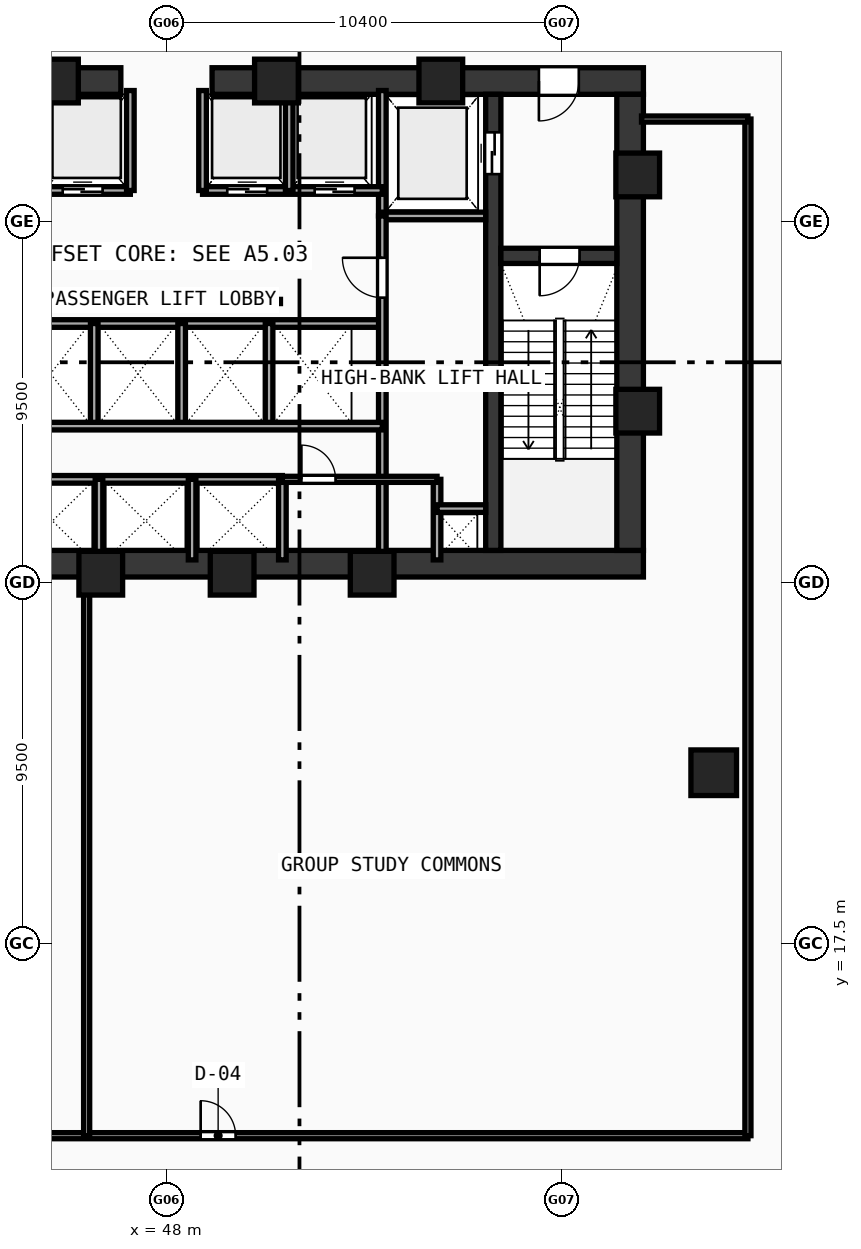
"""IFC4 building model, lengths in metres.
Left out: names, types, materials, properties, quantities, classifications, styles, units other than length and angle.
Written with IfcOpenShell. Run it as: python <this file> out.ifc"""

import sys

from ifc_helpers import new_model, si_unit, direction, frame, frame_2d, origin, origin_with_axes, origin_2d, place, context, subcontext, project, spatial, rectangle, hollow_rectangle, extrude, source, transform, mapped, element, fill, save


model = new_model("IFC4")
c1 = context("Model", 3, precision=1e-05, world=origin(), true_north=direction((0.0, 1.0)))
c2 = subcontext(c1, "Body", "Model", "MODEL_VIEW")
j1 = project(units=[si_unit("LENGTHUNIT", "METRE"), si_unit("PLANEANGLEUNIT", "RADIAN")], contexts=[c1])
p1 = place(None, origin())
s1 = spatial("IfcSite", under=j1, at=p1, CompositionType="ELEMENT")
p2 = place(p1, origin())
s2 = spatial("IfcBuilding", under=s1, at=p2, CompositionType="ELEMENT")
p3 = place(p2, frame((0.0, 0.0, 9.6)))
s3 = spatial("IfcBuildingStorey", under=s2, at=p3, CompositionType="ELEMENT", Elevation=9.6)
p4 = place(p3, frame((35.45, 27.5, 0.0), z_axis=(0.0, 0.0, 1.0), x_axis=(1.0, 0.0, 0.0)))
e1 = element("IfcWall", 1, at=p4, inside=s3, PredefinedType="SHEAR", context=c2, shape_type="SweptSolid", body=[
    extrude(rectangle(XDim=25.1, YDim=0.7, at=frame_2d((12.55, 0.0))), origin(), (0.0, 0.0, 1.0), 4.52),
])
p5 = place(p3, frame((35.45, 40.2, 0.0), z_axis=(0.0, 0.0, 1.0), x_axis=(1.0, 0.0, 0.0)))
e2 = element("IfcWall", 2, at=p5, inside=s3, PredefinedType="SHEAR", context=c2, shape_type="SweptSolid", body=[
    extrude(rectangle(XDim=11.35, YDim=0.7, at=frame_2d((5.675, 0.0))), origin(), (0.0, 0.0, 1.0), 4.52),
])
p6 = place(p5, frame((1.7, 0.0, 0.0)))
e3 = element("IfcOpeningElement", 3, at=p6, cuts=e2, PredefinedType="OPENING", context=c2, shape_type="SweptSolid", body=[
    extrude(rectangle(XDim=1.05, YDim=2.1, at=frame_2d((0.525, 1.05))), frame((0.0, 0.36, 0.0), z_axis=(0.0, -1.0, 0.0), x_axis=(1.0, 0.0, 0.0)), (0.0, 0.0, 1.0), 0.72),
])
p7 = place(p3, frame((49.2, 40.2, 0.0), z_axis=(0.0, 0.0, 1.0), x_axis=(1.0, 0.0, 0.0)))
e4 = element("IfcWall", 4, at=p7, inside=s3, PredefinedType="SHEAR", context=c2, shape_type="SweptSolid", body=[
    extrude(rectangle(XDim=11.35, YDim=0.7, at=frame_2d((5.675, 0.0))), origin(), (0.0, 0.0, 1.0), 4.52),
])
p8 = place(p7, frame((8.6, 0.0, 0.0)))
e5 = element("IfcOpeningElement", 5, at=p8, cuts=e4, PredefinedType="OPENING", context=c2, shape_type="SweptSolid", body=[
    extrude(rectangle(XDim=1.05, YDim=2.1, at=frame_2d((0.525, 1.05))), frame((0.0, 0.36, 0.0), z_axis=(0.0, -1.0, 0.0), x_axis=(1.0, 0.0, 0.0)), (0.0, 0.0, 1.0), 0.72),
])
p9 = place(p3, frame((60.2, 27.85, 0.0), z_axis=(0.0, 0.0, 1.0), x_axis=(0.0, 1.0, 0.0)))
e6 = element("IfcWall", 6, at=p9, inside=s3, PredefinedType="SHEAR", context=c2, shape_type="SweptSolid", body=[
    extrude(rectangle(XDim=12.0, YDim=0.7, at=frame_2d((6.0, 0.0))), origin(), (0.0, 0.0, 1.0), 4.52),
])
p10 = place(p3, frame((56.6, 27.85, 0.0), z_axis=(0.0, 0.0, 1.0), x_axis=(0.0, 1.0, 0.0)))
e7 = element("IfcWall", 7, at=p10, inside=s3, PredefinedType="SHEAR", context=c2, shape_type="SweptSolid", body=[
    extrude(rectangle(XDim=12.0, YDim=0.4, at=frame_2d((6.0, 0.0))), origin(), (0.0, 0.0, 1.0), 4.52),
])
p11 = place(p10, frame((9.9, 0.0, 0.0)))
e8 = element("IfcOpeningElement", 8, at=p11, cuts=e7, PredefinedType="OPENING", context=c2, shape_type="SweptSolid", body=[
    extrude(rectangle(XDim=1.1, YDim=2.1, at=frame_2d((0.55, 1.05))), frame((0.0, 0.21, 0.0), z_axis=(0.0, -1.0, 0.0), x_axis=(1.0, 0.0, 0.0)), (0.0, 0.0, 1.0), 0.42),
])
p12 = place(p3, frame((56.8, 35.6, 0.0), z_axis=(0.0, 0.0, 1.0), x_axis=(1.0, 0.0, 0.0)))
e9 = element("IfcWall", 9, at=p12, inside=s3, PredefinedType="SHEAR", context=c2, shape_type="SweptSolid", body=[
    extrude(rectangle(XDim=3.05, YDim=0.4, at=frame_2d((1.525, 0.0))), origin(), (0.0, 0.0, 1.0), 4.52),
])
p13 = place(p12, frame((1.02, 0.0, 0.0)))
e10 = element("IfcOpeningElement", 10, at=p13, cuts=e9, PredefinedType="OPENING", context=c2, shape_type="SweptSolid", body=[
    extrude(rectangle(XDim=1.05, YDim=2.1, at=frame_2d((0.525, 1.05))), frame((0.0, 0.21, 0.0), z_axis=(0.0, -1.0, 0.0), x_axis=(1.0, 0.0, 0.0)), (0.0, 0.0, 1.0), 0.42),
])
m1 = source(origin(), c2, "Body", "SweptSolid", [
    extrude(hollow_rectangle(XDim=1.15, YDim=1.15, WallThickness=0.048, at=origin_2d()), origin(), (0.0, 0.0, 1.0), 4.8),
])
for number, where, z_axis, x_axis in (
    (11, (46.272, 27.25, -0.28), (0.0, 0.0, 1.0), (1.0, 0.0, 0.0)),
    (12, (49.729, 27.25, -0.28), (0.0, 0.0, 1.0), (1.0, 0.0, 0.0)),
    (13, (53.412, 27.25, -0.28), (0.0, 0.0, 1.0), (1.0, 0.0, 0.0)),
    (14, (60.4, 31.513, -0.28), (0.0, 0.0, 1.0), (1.0, 0.0, 0.0)),
    (15, (60.4, 37.729, -0.28), (0.0, 0.0, 1.0), (1.0, 0.0, 0.0)),
    (16, (55.219, 40.2, -0.28), (0.0, 0.0, 1.0), (1.0, 0.0, 0.0)),
    (17, (50.894, 40.2, -0.28), (0.0, 0.0, 1.0), (1.0, 0.0, 0.0)),
    (18, (45.106, 40.2, -0.28), (0.0, 0.0, 1.0), (1.0, 0.0, 0.0)),
):
    element("IfcColumn", number, at=place(p3, frame(where, z_axis=z_axis, x_axis=x_axis)), inside=s3, PredefinedType="COLUMN", context=c2, shape_type="MappedRepresentation", body=[
        mapped(m1, transform((0.0, 0.0, 0.0), scale=1.0)),
    ])
m2 = source(origin(), c2, "Body", "SweptSolid", [
    extrude(hollow_rectangle(XDim=1.2, YDim=1.2, WallThickness=0.05, at=origin_2d()), origin(), (0.0, 0.0, 1.0), 4.8),
])
p14 = place(p3, frame((62.4, 22.0, -0.28), z_axis=(0.0, 0.0, 1.0), x_axis=(1.0, 0.0, 0.0)))
e19 = element("IfcColumn", 19, at=p14, inside=s3, PredefinedType="COLUMN", context=c2, shape_type="MappedRepresentation", body=[
    mapped(m2, transform((0.0, 0.0, 0.0), scale=1.0)),
])
p15 = place(p3, frame((53.68, 36.65, 0.0), z_axis=(0.0, 0.0, 1.0), x_axis=(0.0, 1.0, 0.0)))
e20 = element("IfcWall", 20, at=p15, inside=s3, PredefinedType="SOLIDWALL", context=c2, shape_type="SweptSolid", body=[
    extrude(rectangle(XDim=3.3, YDim=0.2, at=frame_2d((1.65, 0.0))), origin(), (0.0, 0.0, 1.0), 4.52),
])
p16 = place(p3, frame((53.68, 36.65, 0.0), z_axis=(0.0, 0.0, 1.0), x_axis=(1.0, 0.0, 0.0)))
e21 = element("IfcWall", 21, at=p16, inside=s3, PredefinedType="SOLIDWALL", context=c2, shape_type="SweptSolid", body=[
    extrude(rectangle(XDim=2.72, YDim=0.2, at=frame_2d((1.36, 0.0))), origin(), (0.0, 0.0, 1.0), 4.52),
])
p17 = place(p3, frame((42.32, 37.32, 0.0), z_axis=(0.0, 0.0, 1.0), x_axis=(1.0, 0.0, 0.0)))
e22 = element("IfcWall", 22, at=p17, inside=s3, PredefinedType="SOLIDWALL", context=c2, shape_type="SweptSolid", body=[
    extrude(rectangle(XDim=4.73, YDim=0.2, at=frame_2d((2.365, 0.0))), origin(), (0.0, 0.0, 1.0), 4.52),
])
p18 = place(p17, frame((0.65, 0.0, 0.0)))
e23 = element("IfcOpeningElement", 23, at=p18, cuts=e22, PredefinedType="OPENING", context=c2, shape_type="SweptSolid", body=[
    extrude(rectangle(XDim=1.05, YDim=2.1, at=frame_2d((0.525, 1.05))), frame((0.0, 0.11, 0.0), z_axis=(0.0, -1.0, 0.0), x_axis=(1.0, 0.0, 0.0)), (0.0, 0.0, 1.0), 0.22),
])
p19 = place(p17, frame((2.95, 0.0, 0.0)))
e24 = element("IfcOpeningElement", 24, at=p19, cuts=e22, PredefinedType="OPENING", context=c2, shape_type="SweptSolid", body=[
    extrude(rectangle(XDim=1.05, YDim=2.1, at=frame_2d((0.525, 1.05))), frame((0.0, 0.11, 0.0), z_axis=(0.0, -1.0, 0.0), x_axis=(1.0, 0.0, 0.0)), (0.0, 0.0, 1.0), 0.22),
])
p20 = place(p3, frame((48.95, 37.32, 0.0), z_axis=(0.0, 0.0, 1.0), x_axis=(1.0, 0.0, 0.0)))
e25 = element("IfcWall", 25, at=p20, inside=s3, PredefinedType="SOLIDWALL", context=c2, shape_type="SweptSolid", body=[
    extrude(rectangle(XDim=4.73, YDim=0.2, at=frame_2d((2.365, 0.0))), origin(), (0.0, 0.0, 1.0), 4.52),
])
p21 = place(p20, frame((0.65, 0.0, 0.0)))
e26 = element("IfcOpeningElement", 26, at=p21, cuts=e25, PredefinedType="OPENING", context=c2, shape_type="SweptSolid", body=[
    extrude(rectangle(XDim=1.05, YDim=2.1, at=frame_2d((0.525, 1.05))), frame((0.0, 0.11, 0.0), z_axis=(0.0, -1.0, 0.0), x_axis=(1.0, 0.0, 0.0)), (0.0, 0.0, 1.0), 0.22),
])
p22 = place(p20, frame((2.95, 0.0, 0.0)))
e27 = element("IfcOpeningElement", 27, at=p22, cuts=e25, PredefinedType="OPENING", context=c2, shape_type="SweptSolid", body=[
    extrude(rectangle(XDim=1.05, YDim=2.1, at=frame_2d((0.525, 1.05))), frame((0.0, 0.11, 0.0), z_axis=(0.0, -1.0, 0.0), x_axis=(1.0, 0.0, 0.0)), (0.0, 0.0, 1.0), 0.22),
])
for number, where, z_axis, x_axis in (
    (28, (47.05, 37.32, 0.0), (0.0, 0.0, 1.0), (0.0, 1.0, 0.0)),
    (29, (48.95, 37.32, 0.0), (0.0, 0.0, 1.0), (0.0, 1.0, 0.0)),
    (30, (51.23, 37.32, 0.0), (0.0, 0.0, 1.0), (0.0, 1.0, 0.0)),
):
    element("IfcWall", number, at=place(p3, frame(where, z_axis=z_axis, x_axis=x_axis)), inside=s3, PredefinedType="SOLIDWALL", context=c2, shape_type="SweptSolid", body=[
        extrude(rectangle(XDim=2.63, YDim=0.2, at=frame_2d((1.315, 0.0))), origin(), (0.0, 0.0, 1.0), 4.52),
    ])
p23 = place(p3, frame((43.85, 33.82, 0.0), z_axis=(0.0, 0.0, 1.0), x_axis=(1.0, 0.0, 0.0)))
e31 = element("IfcWall", 31, at=p23, inside=s3, PredefinedType="SOLIDWALL", context=c2, shape_type="SweptSolid", body=[
    extrude(rectangle(XDim=9.83, YDim=0.2, at=frame_2d((4.915, 0.0))), origin(), (0.0, 0.0, 1.0), 4.52),
])
p24 = place(p3, frame((53.68, 27.6, 0.0), z_axis=(0.0, 0.0, 1.0), x_axis=(0.0, 1.0, 0.0)))
e32 = element("IfcWall", 32, at=p24, inside=s3, PredefinedType="SOLIDWALL", context=c2, shape_type="SweptSolid", body=[
    extrude(rectangle(XDim=9.05, YDim=0.2, at=frame_2d((4.525, 0.0))), origin(), (0.0, 0.0, 1.0), 4.52),
])
p25 = place(p24, frame((6.9, 0.0, 0.0)))
e33 = element("IfcOpeningElement", 33, at=p25, cuts=e32, PredefinedType="OPENING", context=c2, shape_type="SweptSolid", body=[
    extrude(rectangle(XDim=1.05, YDim=2.1, at=frame_2d((0.525, 1.05))), frame((0.0, 0.11, 0.0), z_axis=(0.0, -1.0, 0.0), x_axis=(1.0, 0.0, 0.0)), (0.0, 0.0, 1.0), 0.22),
])
for number, where, z_axis, x_axis in (
    (34, (46.1, 31.12, 0.0), (0.0, 0.0, 1.0), (0.0, 1.0, 0.0)),
    (35, (48.4, 31.12, 0.0), (0.0, 0.0, 1.0), (0.0, 1.0, 0.0)),
    (36, (50.7, 31.12, 0.0), (0.0, 0.0, 1.0), (0.0, 1.0, 0.0)),
):
    element("IfcWall", number, at=place(p3, frame(where, z_axis=z_axis, x_axis=x_axis)), inside=s3, PredefinedType="SOLIDWALL", context=c2, shape_type="SweptSolid", body=[
        extrude(rectangle(XDim=2.7, YDim=0.2, at=frame_2d((1.35, 0.0))), origin(), (0.0, 0.0, 1.0), 4.52),
    ])
p26 = place(p3, frame((43.85, 29.72, 0.0), z_axis=(0.0, 0.0, 1.0), x_axis=(1.0, 0.0, 0.0)))
e37 = element("IfcWall", 37, at=p26, inside=s3, PredefinedType="SOLIDWALL", context=c2, shape_type="SweptSolid", body=[
    extrude(rectangle(XDim=7.2, YDim=0.2, at=frame_2d((3.6, 0.0))), origin(), (0.0, 0.0, 1.0), 4.52),
])
p27 = place(p3, frame((51.05, 27.6, 0.0), z_axis=(0.0, 0.0, 1.0), x_axis=(0.0, 1.0, 0.0)))
e38 = element("IfcWall", 38, at=p27, inside=s3, PredefinedType="SOLIDWALL", context=c2, shape_type="SweptSolid", body=[
    extrude(rectangle(XDim=2.12, YDim=0.2, at=frame_2d((1.06, 0.0))), origin(), (0.0, 0.0, 1.0), 4.52),
])
p28 = place(p3, frame((43.85, 31.12, 0.0), z_axis=(0.0, 0.0, 1.0), x_axis=(1.0, 0.0, 0.0)))
e39 = element("IfcWall", 39, at=p28, inside=s3, PredefinedType="SOLIDWALL", context=c2, shape_type="SweptSolid", body=[
    extrude(rectangle(XDim=9.83, YDim=0.2, at=frame_2d((4.915, 0.0))), origin(), (0.0, 0.0, 1.0), 4.52),
])
for number, where, z_axis, x_axis in (
    (40, (46.225, 27.6, 0.0), (0.0, 0.0, 1.0), (0.0, 1.0, 0.0)),
    (41, (48.675, 27.6, 0.0), (0.0, 0.0, 1.0), (0.0, 1.0, 0.0)),
    (42, (55.12, 27.6, 0.0), (0.0, 0.0, 1.0), (0.0, 1.0, 0.0)),
):
    element("IfcWall", number, at=place(p3, frame(where, z_axis=z_axis, x_axis=x_axis)), inside=s3, PredefinedType="SOLIDWALL", context=c2, shape_type="SweptSolid", body=[
        extrude(rectangle(XDim=2.12, YDim=0.2, at=frame_2d((1.06, 0.0))), origin(), (0.0, 0.0, 1.0), 4.52),
    ])
p29 = place(p3, frame((55.12, 28.95, 0.0), z_axis=(0.0, 0.0, 1.0), x_axis=(1.0, 0.0, 0.0)))
e43 = element("IfcWall", 43, at=p29, inside=s3, PredefinedType="SOLIDWALL", context=c2, shape_type="SweptSolid", body=[
    extrude(rectangle(XDim=1.28, YDim=0.2, at=frame_2d((0.64, 0.0))), origin(), (0.0, 0.0, 1.0), 4.52),
])
p30 = place(p3, frame((51.05, 29.72, 0.0), z_axis=(0.0, 0.0, 1.0), x_axis=(1.0, 0.0, 0.0)))
e44 = element("IfcWall", 44, at=p30, inside=s3, PredefinedType="PARTITIONING", context=c2, shape_type="SweptSolid", body=[
    extrude(rectangle(XDim=4.07, YDim=0.16, at=frame_2d((2.035, 0.0))), origin(), (0.0, 0.0, 1.0), 4.52),
])
p31 = place(p30, frame((0.5, 0.0, 0.0)))
e45 = element("IfcOpeningElement", 45, at=p31, cuts=e44, PredefinedType="OPENING", context=c2, shape_type="SweptSolid", body=[
    extrude(rectangle(XDim=0.9, YDim=2.1, at=frame_2d((0.45, 1.05))), frame((0.0, 0.09, 0.0), z_axis=(0.0, -1.0, 0.0), x_axis=(1.0, 0.0, 0.0)), (0.0, 0.0, 1.0), 0.18),
])
p32 = place(p3, frame((32.7, 12.45, 0.0), z_axis=(0.0, 0.0, 1.0), x_axis=(1.0, 0.0, 0.0)))
e46 = element("IfcWall", 46, at=p32, inside=s3, PredefinedType="PARTITIONING", context=c2, shape_type="SweptSolid", body=[
    extrude(rectangle(XDim=30.6, YDim=0.16, at=frame_2d((15.3, 0.0))), origin(), (0.0, 0.0, 1.0), 3.62),
])
p33 = place(p32, frame((16.2, 0.0, 0.0)))
e47 = element("IfcOpeningElement", 47, at=p33, cuts=e46, PredefinedType="OPENING", context=c2, shape_type="SweptSolid", body=[
    extrude(rectangle(XDim=0.92, YDim=2.1, at=frame_2d((0.46, 1.05))), frame((0.0, 0.09, 0.0), z_axis=(0.0, -1.0, 0.0), x_axis=(1.0, 0.0, 0.0)), (0.0, 0.0, 1.0), 0.18),
])
p34 = place(p32, frame((5.9, 0.0, 0.0)))
e48 = element("IfcOpeningElement", 48, at=p34, cuts=e46, PredefinedType="OPENING", context=c2, shape_type="SweptSolid", body=[
    extrude(rectangle(XDim=0.94, YDim=2.1, at=frame_2d((0.47, 1.05))), frame((0.0, 0.09, 0.0), z_axis=(0.0, -1.0, 0.0), x_axis=(1.0, 0.0, 0.0)), (0.0, 0.0, 1.0), 0.18),
])
p35 = place(p3, frame((63.3, 12.45, 0.0), z_axis=(0.0, 0.0, 1.0), x_axis=(0.0, 1.0, 0.0)))
e49 = element("IfcWall", 49, at=p35, inside=s3, PredefinedType="PARTITIONING", context=c2, shape_type="SweptSolid", body=[
    extrude(rectangle(XDim=26.75, YDim=0.16, at=frame_2d((13.375, 0.0))), origin(), (0.0, 0.0, 1.0), 3.62),
])
p36 = place(p3, frame((60.5, 39.2, 0.0), z_axis=(0.0, 0.0, 1.0), x_axis=(1.0, 0.0, 0.0)))
e50 = element("IfcWall", 50, at=p36, inside=s3, PredefinedType="PARTITIONING", context=c2, shape_type="SweptSolid", body=[
    extrude(rectangle(XDim=2.8, YDim=0.16, at=frame_2d((1.4, 0.0))), origin(), (0.0, 0.0, 1.0), 3.62),
])
p37 = place(p3, frame((45.9, 12.45, 0.0), z_axis=(0.0, 0.0, 1.0), x_axis=(0.0, 1.0, 0.0)))
e51 = element("IfcWall", 51, at=p37, inside=s3, PredefinedType="PARTITIONING", context=c2, shape_type="SweptSolid", body=[
    extrude(rectangle(XDim=15.05, YDim=0.16, at=frame_2d((7.525, 0.0))), origin(), (0.0, 0.0, 1.0), 3.62),
])
p38 = place(p3, frame((45.0, 34.4, 0.0), z_axis=(0.0, 0.0, 1.0), x_axis=(1.0, 0.0, 0.0)))
e52 = element("IfcWall", 52, at=p38, inside=s3, PredefinedType="MOVABLE", context=c2, shape_type="SweptSolid", body=[
    extrude(rectangle(XDim=6.0, YDim=0.11, at=frame_2d((3.0, 0.0))), origin(), (0.0, 0.0, 1.0), 2.5),
])
m3 = source(origin(), c2, "Body", "SweptSolid", [
    extrude(rectangle(XDim=1.05, YDim=2.1, at=frame_2d((0.525, 1.05))), frame((0.0, 0.025, 0.0), z_axis=(0.0, -1.0, 0.0), x_axis=(1.0, 0.0, 0.0)), (0.0, 0.0, 1.0), 0.05),
])
p39 = place(p13, frame((1.05, 0.0, 0.0), z_axis=(0.0, 0.0, 1.0), x_axis=(-1.0, 0.0, 0.0)))
e53 = element("IfcDoor", 53, at=p39, inside=s3, OperationType="SINGLE_SWING_RIGHT", PredefinedType="DOOR", context=c2, shape_type="MappedRepresentation", body=[
    mapped(m3, transform((0.0, 0.0, 0.0), scale=1.0)),
])
fill(e10, e53)
p40 = place(p8, frame((1.05, 0.0, 0.0), z_axis=(0.0, 0.0, 1.0), x_axis=(-1.0, 0.0, 0.0)))
e54 = element("IfcDoor", 54, at=p40, inside=s3, OperationType="SINGLE_SWING_RIGHT", PredefinedType="DOOR", context=c2, shape_type="MappedRepresentation", body=[
    mapped(m3, transform((0.0, 0.0, 0.0), scale=1.0)),
])
fill(e5, e54)
m4 = source(origin(), c2, "Body", "SweptSolid", [
    extrude(rectangle(XDim=1.1, YDim=2.1, at=frame_2d((0.55, 1.05))), frame((0.0, 0.025, 0.0), z_axis=(0.0, -1.0, 0.0), x_axis=(1.0, 0.0, 0.0)), (0.0, 0.0, 1.0), 0.05),
])
p41 = place(p11, origin_with_axes())
e55 = element("IfcDoor", 55, at=p41, inside=s3, OperationType="DOUBLE_DOOR_SLIDING", PredefinedType="DOOR", context=c2, shape_type="MappedRepresentation", body=[
    mapped(m4, transform((0.0, 0.0, 0.0), scale=1.0)),
])
fill(e8, e55)
p42 = place(p19, frame((1.05, 0.0, 0.0), z_axis=(0.0, 0.0, 1.0), x_axis=(-1.0, 0.0, 0.0)))
e56 = element("IfcDoor", 56, at=p42, inside=s3, OperationType="DOUBLE_DOOR_SLIDING", PredefinedType="DOOR", context=c2, shape_type="MappedRepresentation", body=[
    mapped(m3, transform((0.0, 0.0, 0.0), scale=1.0)),
])
fill(e24, e56)
p43 = place(p21, frame((1.05, 0.0, 0.0), z_axis=(0.0, 0.0, 1.0), x_axis=(-1.0, 0.0, 0.0)))
e57 = element("IfcDoor", 57, at=p43, inside=s3, OperationType="DOUBLE_DOOR_SLIDING", PredefinedType="DOOR", context=c2, shape_type="MappedRepresentation", body=[
    mapped(m3, transform((0.0, 0.0, 0.0), scale=1.0)),
])
fill(e26, e57)
p44 = place(p22, frame((1.05, 0.0, 0.0), z_axis=(0.0, 0.0, 1.0), x_axis=(-1.0, 0.0, 0.0)))
e58 = element("IfcDoor", 58, at=p44, inside=s3, OperationType="DOUBLE_DOOR_SLIDING", PredefinedType="DOOR", context=c2, shape_type="MappedRepresentation", body=[
    mapped(m3, transform((0.0, 0.0, 0.0), scale=1.0)),
])
fill(e27, e58)
p45 = place(p25, origin_with_axes())
e59 = element("IfcDoor", 59, at=p45, inside=s3, OperationType="SINGLE_SWING_RIGHT", PredefinedType="DOOR", context=c2, shape_type="MappedRepresentation", body=[
    mapped(m3, transform((0.0, 0.0, 0.0), scale=1.0)),
])
fill(e33, e59)
m5 = source(origin(), c2, "Body", "SweptSolid", [
    extrude(rectangle(XDim=0.9, YDim=2.1, at=frame_2d((0.45, 1.05))), frame((0.0, 0.025, 0.0), z_axis=(0.0, -1.0, 0.0), x_axis=(1.0, 0.0, 0.0)), (0.0, 0.0, 1.0), 0.05),
])
p46 = place(p31, origin_with_axes())
e60 = element("IfcDoor", 60, at=p46, inside=s3, OperationType="SINGLE_SWING_LEFT", PredefinedType="DOOR", context=c2, shape_type="MappedRepresentation", body=[
    mapped(m5, transform((0.0, 0.0, 0.0), scale=1.0)),
])
fill(e45, e60)
m6 = source(origin(), c2, "Body", "SweptSolid", [
    extrude(rectangle(XDim=0.92, YDim=2.1, at=frame_2d((0.46, 1.05))), frame((0.0, 0.025, 0.0), z_axis=(0.0, -1.0, 0.0), x_axis=(1.0, 0.0, 0.0)), (0.0, 0.0, 1.0), 0.05),
])
p47 = place(p33, origin_with_axes())
e61 = element("IfcDoor", 61, at=p47, inside=s3, OperationType="SINGLE_SWING_LEFT", PredefinedType="DOOR", context=c2, shape_type="MappedRepresentation", body=[
    mapped(m6, transform((0.0, 0.0, 0.0), scale=1.0)),
])
fill(e47, e61)
save(model, sys.argv[1])
